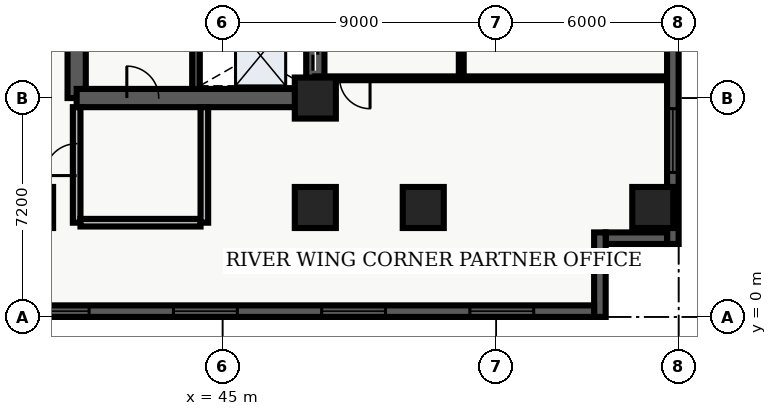
"""IFC4 building model, lengths in metres.
Left out: names, types, materials, properties, quantities, classifications, styles, units other than length and angle.
Written with IfcOpenShell. Run it as: python <this file> out.ifc"""

import sys

from ifc_helpers import new_model, entity, si_unit, converted_unit, direction, frame, origin_with_axes, origin_2d_with_axis, place, context, subcontext, project, spatial, polyline, rectangle, outline, extrude, element, fill, save


model = new_model("IFC4")
c1 = context("Model", 3, precision=1e-05, world=origin_with_axes(), true_north=direction((0.0, 1.0)))
c2 = subcontext(c1, "Body", "Model", "MODEL_VIEW")
j1 = project(units=[si_unit("LENGTHUNIT", "METRE"), converted_unit("PLANEANGLEUNIT", "DEGREE", entity("IfcPlaneAngleMeasure", 0.017), si_unit("PLANEANGLEUNIT", "RADIAN"), dimensions=[0, 0, 0, 0, 0, 0, 0])], contexts=[c1])
p1 = place(None, origin_with_axes())
s1 = spatial("IfcSite", under=j1, at=p1, CompositionType="ELEMENT")
p2 = place(p1, origin_with_axes())
s2 = spatial("IfcBuilding", under=s1, at=p2, CompositionType="ELEMENT")
p3 = place(p2, frame((0.0, 0.0, 56.1), z_axis=(0.0, 0.0, 1.0), x_axis=(1.0, 0.0, 0.0)))
s3 = spatial("IfcBuildingStorey", under=s2, at=p3, CompositionType="ELEMENT", Elevation=56.1)
p4 = place(p3, frame((40.2, 7.2, 0.0), z_axis=(0.0, 0.0, 1.0), x_axis=(0.0, 1.0, 0.0)))
e1 = element("IfcWall", 1, at=p4, inside=s3, PredefinedType="SHEAR", context=c2, shape_type="SweptSolid", body=[
    extrude(outline(polyline([(0.0, -0.3), (15.6, -0.3), (15.6, 0.3), (0.0, 0.3), (0.0, -0.3)])), origin_with_axes(), (0.0, 0.0, 1.0), 3.66),
])
p5 = place(p4, frame((12.75, 0.0, 0.0), z_axis=(0.0, 0.0, 1.0), x_axis=(1.0, 0.0, 0.0)))
e2 = element("IfcOpeningElement", 2, at=p5, cuts=e1, PredefinedType="OPENING", context=c2, shape_type="SweptSolid", body=[
    extrude(rectangle(XDim=1.2, YDim=0.62, at=origin_2d_with_axis()), origin_with_axes(), (0.0, 0.0, 1.0), 2.15),
])
p6 = place(p4, frame((9.3, 0.0, 0.0), z_axis=(0.0, 0.0, 1.0), x_axis=(1.0, 0.0, 0.0)))
e3 = element("IfcOpeningElement", 3, at=p6, cuts=e1, PredefinedType="OPENING", context=c2, shape_type="SweptSolid", body=[
    extrude(rectangle(XDim=0.9, YDim=0.62, at=origin_2d_with_axis()), origin_with_axes(), (0.0, 0.0, 1.0), 2.15),
])
p7 = place(p3, frame((40.2, 7.2, 0.0), z_axis=(0.0, 0.0, 1.0), x_axis=(1.0, 0.0, 0.0)))
e4 = element("IfcWall", 4, at=p7, inside=s3, PredefinedType="SHEAR", context=c2, shape_type="SweptSolid", body=[
    extrude(outline(polyline([(0.0, -0.3), (7.85, -0.3), (7.85, 0.3), (0.0, 0.3), (0.0, -0.3)])), origin_with_axes(), (0.0, 0.0, 1.0), 3.66),
])
p8 = place(p7, frame((2.175, 0.0, 0.0), z_axis=(0.0, 0.0, 1.0), x_axis=(1.0, 0.0, 0.0)))
e5 = element("IfcOpeningElement", 5, at=p8, cuts=e4, PredefinedType="OPENING", context=c2, shape_type="SweptSolid", body=[
    extrude(rectangle(XDim=1.05, YDim=0.62, at=origin_2d_with_axis()), origin_with_axes(), (0.0, 0.0, 1.0), 2.15),
])
p9 = place(p3, frame((48.05, 7.2, 0.0), z_axis=(0.0, 0.0, 1.0), x_axis=(0.0, 1.0, 0.0)))
e6 = element("IfcWall", 6, at=p9, inside=s3, PredefinedType="SHEAR", context=c2, shape_type="SweptSolid", body=[
    extrude(outline(polyline([(0.0, -0.3), (15.6, -0.3), (15.6, 0.3), (0.0, 0.3), (0.0, -0.3)])), origin_with_axes(), (0.0, 0.0, 1.0), 3.66),
])
p10 = place(p9, frame((1.425, 0.0, 0.0), z_axis=(0.0, 0.0, 1.0), x_axis=(1.0, 0.0, 0.0)))
e7 = element("IfcOpeningElement", 7, at=p10, cuts=e6, PredefinedType="OPENING", context=c2, shape_type="SweptSolid", body=[
    extrude(rectangle(XDim=1.05, YDim=0.62, at=origin_2d_with_axis()), origin_with_axes(), (0.0, 0.0, 1.0), 2.15),
])
p11 = place(p9, frame((3.475, 0.0, 0.0), z_axis=(0.0, 0.0, 1.0), x_axis=(1.0, 0.0, 0.0)))
e8 = element("IfcOpeningElement", 8, at=p11, cuts=e6, PredefinedType="OPENING", context=c2, shape_type="SweptSolid", body=[
    extrude(rectangle(XDim=1.05, YDim=0.62, at=origin_2d_with_axis()), origin_with_axes(), (0.0, 0.0, 1.0), 2.15),
])
p12 = place(p9, frame((5.625, 0.0, 0.0), z_axis=(0.0, 0.0, 1.0), x_axis=(1.0, 0.0, 0.0)))
e9 = element("IfcOpeningElement", 9, at=p12, cuts=e6, PredefinedType="OPENING", context=c2, shape_type="SweptSolid", body=[
    extrude(rectangle(XDim=0.95, YDim=0.62, at=origin_2d_with_axis()), origin_with_axes(), (0.0, 0.0, 1.0), 2.15),
])
p13 = place(p3, frame((44.125, 7.5, 0.0), z_axis=(0.0, 0.0, 1.0), x_axis=(0.0, 1.0, 0.0)))
e10 = element("IfcWall", 10, at=p13, inside=s3, PredefinedType="SHEAR", context=c2, shape_type="SweptSolid", body=[
    extrude(outline(polyline([(0.0, -0.125), (15.0, -0.125), (15.0, 0.125), (0.0, 0.125), (0.0, -0.125)])), origin_with_axes(), (0.0, 0.0, 1.0), 3.66),
])
p14 = place(p3, frame((40.2, 3.1, 0.0), z_axis=(0.0, 0.0, 1.0), x_axis=(0.0, 1.0, 0.0)))
e11 = element("IfcWall", 11, at=p14, inside=s3, PredefinedType="SOLIDWALL", context=c2, shape_type="SweptSolid", body=[
    extrude(outline(polyline([(0.0, -0.125), (3.8, -0.125), (3.8, 0.125), (0.0, 0.125), (0.0, -0.125)])), origin_with_axes(), (0.0, 0.0, 1.0), 2.7),
])
p15 = place(p14, frame((2.075, 0.0, 0.0), z_axis=(0.0, 0.0, 1.0), x_axis=(1.0, 0.0, 0.0)))
e12 = element("IfcOpeningElement", 12, at=p15, cuts=e11, PredefinedType="OPENING", context=c2, shape_type="SweptSolid", body=[
    extrude(rectangle(XDim=1.05, YDim=0.27, at=origin_2d_with_axis()), origin_with_axes(), (0.0, 0.0, 1.0), 2.15),
])
p16 = place(p3, frame((40.325, 3.1, 0.0), z_axis=(0.0, 0.0, 1.0), x_axis=(1.0, 0.0, 0.0)))
e13 = element("IfcWall", 13, at=p16, inside=s3, PredefinedType="SOLIDWALL", context=c2, shape_type="SweptSolid", body=[
    extrude(outline(polyline([(0.0, -0.125), (3.95, -0.125), (3.95, 0.125), (0.0, 0.125), (0.0, -0.125)])), origin_with_axes(), (0.0, 0.0, 1.0), 2.7),
])
p17 = place(p3, frame((44.4, 3.1, 0.0), z_axis=(0.0, 0.0, 1.0), x_axis=(0.0, 1.0, 0.0)))
e14 = element("IfcWall", 14, at=p17, inside=s3, PredefinedType="SOLIDWALL", context=c2, shape_type="SweptSolid", body=[
    extrude(outline(polyline([(0.0, -0.125), (3.8, -0.125), (3.8, 0.125), (0.0, 0.125), (0.0, -0.125)])), origin_with_axes(), (0.0, 0.0, 1.0), 2.7),
])
for number, where, z_axis, x_axis in (
    (15, (38.75, 3.6, 0.0), (0.0, 0.0, 1.0), (1.0, 0.0, 0.0)),
    (16, (48.05, 3.6, 0.0), (0.0, 0.0, 1.0), (1.0, 0.0, 0.0)),
    (17, (48.05, 7.2, 0.0), (0.0, 0.0, 1.0), (1.0, 0.0, 0.0)),
    (18, (51.6, 3.6, 0.0), (0.0, 0.0, 1.0), (1.0, 0.0, 0.0)),
    (19, (59.15, 3.6, 0.0), (0.0, 0.0, 1.0), (1.0, 0.0, 0.0)),
):
    element("IfcColumn", number, at=place(p3, frame(where, z_axis=z_axis, x_axis=x_axis)), inside=s3, PredefinedType="COLUMN", context=c2, shape_type="SweptSolid", body=[
        extrude(rectangle(XDim=1.35, YDim=1.35, at=origin_2d_with_axis()), origin_with_axes(), (0.0, 0.0, 1.0), 3.9),
    ])
p18 = place(p3, frame((52.85, 7.85, 0.0), z_axis=(0.0, 0.0, 1.0), x_axis=(0.0, 1.0, 0.0)))
e20 = element("IfcWall", 20, at=p18, inside=s3, PredefinedType="PARTITIONING", context=c2, shape_type="SweptSolid", body=[
    extrude(outline(polyline([(0.0, -0.08), (18.8, -0.08), (18.8, 0.08), (0.0, 0.08), (0.0, -0.08)])), origin_with_axes(), (0.0, 0.0, 1.0), 2.7),
])
p19 = place(p18, frame((4.4, 0.0, 0.0), z_axis=(0.0, 0.0, 1.0), x_axis=(1.0, 0.0, 0.0)))
e21 = element("IfcOpeningElement", 21, at=p19, cuts=e20, PredefinedType="OPENING", context=c2, shape_type="SweptSolid", body=[
    extrude(rectangle(XDim=1.0, YDim=0.18, at=origin_2d_with_axis()), origin_with_axes(), (0.0, 0.0, 1.0), 2.15),
])
p20 = place(p18, frame((7.799, 0.0, 0.0), z_axis=(0.0, 0.0, 1.0), x_axis=(1.0, 0.0, 0.0)))
e22 = element("IfcOpeningElement", 22, at=p20, cuts=e20, PredefinedType="OPENING", context=c2, shape_type="SweptSolid", body=[
    extrude(rectangle(XDim=1.0, YDim=0.18, at=origin_2d_with_axis()), origin_with_axes(), (0.0, 0.0, 1.0), 2.15),
])
p21 = place(p18, frame((14.034, 0.0, 0.0), z_axis=(0.0, 0.0, 1.0), x_axis=(1.0, 0.0, 0.0)))
e23 = element("IfcOpeningElement", 23, at=p21, cuts=e20, PredefinedType="OPENING", context=c2, shape_type="SweptSolid", body=[
    extrude(rectangle(XDim=1.0, YDim=0.18, at=origin_2d_with_axis()), origin_with_axes(), (0.0, 0.0, 1.0), 2.15),
])
p22 = place(p3, frame((59.64, 7.85, 0.0), z_axis=(0.0, 0.0, 1.0), x_axis=(-1.0, 0.0, 0.0)))
e24 = element("IfcWall", 24, at=p22, inside=s3, PredefinedType="PARTITIONING", context=c2, shape_type="SweptSolid", body=[
    extrude(outline(polyline([(0.0, -0.062), (11.59, -0.062), (11.59, 0.062), (0.0, 0.062), (0.0, -0.062)])), origin_with_axes(), (0.0, 0.0, 1.0), 2.7),
])
p23 = place(p22, frame((10.29, 0.0, 0.0), z_axis=(0.0, 0.0, 1.0), x_axis=(1.0, 0.0, 0.0)))
e25 = element("IfcOpeningElement", 25, at=p23, cuts=e24, PredefinedType="OPENING", context=c2, shape_type="SweptSolid", body=[
    extrude(rectangle(XDim=1.0, YDim=0.145, at=origin_2d_with_axis()), origin_with_axes(), (0.0, 0.0, 1.0), 2.15),
])
p24 = place(p3, frame((59.81, 26.02, 0.0), z_axis=(0.0, 0.0, 1.0), x_axis=(0.0, -1.0, 0.0)))
e26 = element("IfcWall", 26, at=p24, inside=s3, PredefinedType="SOLIDWALL", context=c2, shape_type="SweptSolid", body=[
    extrude(outline(polyline([(0.0, -0.19), (23.62, -0.19), (23.62, 0.19), (0.0, 0.19), (0.0, -0.19)])), origin_with_axes(), (0.0, 0.0, 1.0), 3.66),
])
p25 = place(p24, frame((3.853, 0.0, 0.45), z_axis=(0.0, 0.0, 1.0), x_axis=(1.0, 0.0, 0.0)))
e27 = element("IfcOpeningElement", 27, at=p25, cuts=e26, PredefinedType="OPENING", context=c2, shape_type="SweptSolid", body=[
    extrude(rectangle(XDim=2.1, YDim=0.4, at=origin_2d_with_axis()), origin_with_axes(), (0.0, 0.0, 1.0), 2.2),
])
p26 = place(p24, frame((20.218, 0.0, 0.45), z_axis=(0.0, 0.0, 1.0), x_axis=(1.0, 0.0, 0.0)))
e28 = element("IfcOpeningElement", 28, at=p26, cuts=e26, PredefinedType="OPENING", context=c2, shape_type="SweptSolid", body=[
    extrude(rectangle(XDim=2.1, YDim=0.4, at=origin_2d_with_axis()), origin_with_axes(), (0.0, 0.0, 1.0), 2.2),
])
p27 = place(p3, frame((59.62, 2.59, 0.0), z_axis=(0.0, 0.0, 1.0), x_axis=(-1.0, 0.0, 0.0)))
e29 = element("IfcWall", 29, at=p27, inside=s3, PredefinedType="SOLIDWALL", context=c2, shape_type="SweptSolid", body=[
    extrude(outline(polyline([(0.0, -0.19), (2.02, -0.19), (2.02, 0.19), (0.0, 0.19), (0.0, -0.19)])), origin_with_axes(), (0.0, 0.0, 1.0), 3.66),
])
p28 = place(p3, frame((57.41, 2.78, 0.0), z_axis=(0.0, 0.0, 1.0), x_axis=(0.0, -1.0, 0.0)))
e30 = element("IfcWall", 30, at=p28, inside=s3, PredefinedType="SOLIDWALL", context=c2, shape_type="SweptSolid", body=[
    extrude(outline(polyline([(0.0, -0.19), (2.78, -0.19), (2.78, 0.19), (0.0, 0.19), (0.0, -0.19)])), origin_with_axes(), (0.0, 0.0, 1.0), 3.66),
])
p29 = place(p3, frame((57.22, 0.19, 0.0), z_axis=(0.0, 0.0, 1.0), x_axis=(-1.0, 0.0, 0.0)))
e31 = element("IfcWall", 31, at=p29, inside=s3, PredefinedType="SOLIDWALL", context=c2, shape_type="SweptSolid", body=[
    extrude(outline(polyline([(0.0, -0.19), (54.82, -0.19), (54.82, 0.19), (0.0, 0.19), (0.0, -0.19)])), origin_with_axes(), (0.0, 0.0, 1.0), 3.66),
])
p30 = place(p29, frame((3.037, 0.0, 0.45), z_axis=(0.0, 0.0, 1.0), x_axis=(1.0, 0.0, 0.0)))
e32 = element("IfcOpeningElement", 32, at=p30, cuts=e31, PredefinedType="OPENING", context=c2, shape_type="SweptSolid", body=[
    extrude(rectangle(XDim=2.1, YDim=0.4, at=origin_2d_with_axis()), origin_with_axes(), (0.0, 0.0, 1.0), 2.2),
])
p31 = place(p29, frame((7.912, 0.0, 0.45), z_axis=(0.0, 0.0, 1.0), x_axis=(1.0, 0.0, 0.0)))
e33 = element("IfcOpeningElement", 33, at=p31, cuts=e31, PredefinedType="OPENING", context=c2, shape_type="SweptSolid", body=[
    extrude(rectangle(XDim=2.1, YDim=0.4, at=origin_2d_with_axis()), origin_with_axes(), (0.0, 0.0, 1.0), 2.2),
])
p32 = place(p29, frame((12.786, 0.0, 0.45), z_axis=(0.0, 0.0, 1.0), x_axis=(1.0, 0.0, 0.0)))
e34 = element("IfcOpeningElement", 34, at=p32, cuts=e31, PredefinedType="OPENING", context=c2, shape_type="SweptSolid", body=[
    extrude(rectangle(XDim=2.1, YDim=0.4, at=origin_2d_with_axis()), origin_with_axes(), (0.0, 0.0, 1.0), 2.2),
])
p33 = place(p29, frame((17.661, 0.0, 0.45), z_axis=(0.0, 0.0, 1.0), x_axis=(1.0, 0.0, 0.0)))
e35 = element("IfcOpeningElement", 35, at=p33, cuts=e31, PredefinedType="OPENING", context=c2, shape_type="SweptSolid", body=[
    extrude(rectangle(XDim=2.1, YDim=0.4, at=origin_2d_with_axis()), origin_with_axes(), (0.0, 0.0, 1.0), 2.2),
])
p34 = place(p29, frame((22.535, 0.0, 0.45), z_axis=(0.0, 0.0, 1.0), x_axis=(1.0, 0.0, 0.0)))
e36 = element("IfcOpeningElement", 36, at=p34, cuts=e31, PredefinedType="OPENING", context=c2, shape_type="SweptSolid", body=[
    extrude(rectangle(XDim=2.1, YDim=0.4, at=origin_2d_with_axis()), origin_with_axes(), (0.0, 0.0, 1.0), 2.2),
])
p35 = place(p29, frame((37.159, 0.0, 0.45), z_axis=(0.0, 0.0, 1.0), x_axis=(1.0, 0.0, 0.0)))
e37 = element("IfcOpeningElement", 37, at=p35, cuts=e31, PredefinedType="OPENING", context=c2, shape_type="SweptSolid", body=[
    extrude(rectangle(XDim=2.1, YDim=0.4, at=origin_2d_with_axis()), origin_with_axes(), (0.0, 0.0, 1.0), 2.2),
])
p36 = place(p29, frame((42.034, 0.0, 0.45), z_axis=(0.0, 0.0, 1.0), x_axis=(1.0, 0.0, 0.0)))
e38 = element("IfcOpeningElement", 38, at=p36, cuts=e31, PredefinedType="OPENING", context=c2, shape_type="SweptSolid", body=[
    extrude(rectangle(XDim=2.1, YDim=0.4, at=origin_2d_with_axis()), origin_with_axes(), (0.0, 0.0, 1.0), 2.2),
])
p37 = place(p29, frame((51.783, 0.0, 0.45), z_axis=(0.0, 0.0, 1.0), x_axis=(1.0, 0.0, 0.0)))
e39 = element("IfcOpeningElement", 39, at=p37, cuts=e31, PredefinedType="OPENING", context=c2, shape_type="SweptSolid", body=[
    extrude(rectangle(XDim=2.1, YDim=0.4, at=origin_2d_with_axis()), origin_with_axes(), (0.0, 0.0, 1.0), 2.2),
])
p38 = place(p9, frame((1.425, 0.0, 0.0), z_axis=(0.0, 0.0, 1.0), x_axis=(1.0, 0.0, 0.0)))
e40 = element("IfcDoor", 40, at=p38, inside=s3, OperationType="SLIDING_TO_LEFT", PredefinedType="DOOR", context=c2, shape_type="SweptSolid", body=[
    extrude(rectangle(XDim=1.05, YDim=0.09, at=origin_2d_with_axis()), origin_with_axes(), (0.0, 0.0, 1.0), 2.15),
])
fill(e7, e40)
p39 = place(p7, frame((2.175, 0.0, 0.0), z_axis=(0.0, 0.0, 1.0), x_axis=(1.0, 0.0, 0.0)))
e41 = element("IfcDoor", 41, at=p39, inside=s3, OperationType="SINGLE_SWING_LEFT", PredefinedType="DOOR", context=c2, shape_type="SweptSolid", body=[
    extrude(rectangle(XDim=1.05, YDim=0.09, at=origin_2d_with_axis()), origin_with_axes(), (0.0, 0.0, 1.0), 2.15),
])
fill(e5, e41)
p40 = place(p14, frame((2.075, 0.0, 0.0), z_axis=(0.0, 0.0, 1.0), x_axis=(1.0, 0.0, 0.0)))
e42 = element("IfcDoor", 42, at=p40, inside=s3, OperationType="SINGLE_SWING_LEFT", PredefinedType="DOOR", context=c2, shape_type="SweptSolid", body=[
    extrude(rectangle(XDim=1.05, YDim=0.09, at=origin_2d_with_axis()), origin_with_axes(), (0.0, 0.0, 1.0), 2.15),
])
fill(e12, e42)
p41 = place(p22, frame((10.29, 0.0, 0.0), z_axis=(0.0, 0.0, 1.0), x_axis=(1.0, 0.0, 0.0)))
e43 = element("IfcDoor", 43, at=p41, inside=s3, OperationType="SINGLE_SWING_LEFT", PredefinedType="DOOR", context=c2, shape_type="SweptSolid", body=[
    extrude(rectangle(XDim=1.0, YDim=0.075, at=origin_2d_with_axis()), origin_with_axes(), (0.0, 0.0, 1.0), 2.15),
])
fill(e25, e43)
p42 = place(p24, frame((20.218, 0.0, 0.45), z_axis=(0.0, 0.0, 1.0), x_axis=(1.0, 0.0, 0.0)))
e44 = element("IfcWindow", 44, at=p42, inside=s3, PredefinedType="WINDOW", context=c2, shape_type="SweptSolid", body=[
    extrude(rectangle(XDim=2.1, YDim=0.09, at=origin_2d_with_axis()), origin_with_axes(), (0.0, 0.0, 1.0), 2.2),
])
fill(e28, e44)
p43 = place(p29, frame((3.037, 0.0, 0.45), z_axis=(0.0, 0.0, 1.0), x_axis=(1.0, 0.0, 0.0)))
e45 = element("IfcWindow", 45, at=p43, inside=s3, PredefinedType="WINDOW", context=c2, shape_type="SweptSolid", body=[
    extrude(rectangle(XDim=2.1, YDim=0.09, at=origin_2d_with_axis()), origin_with_axes(), (0.0, 0.0, 1.0), 2.2),
])
fill(e32, e45)
p44 = place(p29, frame((7.912, 0.0, 0.45), z_axis=(0.0, 0.0, 1.0), x_axis=(1.0, 0.0, 0.0)))
e46 = element("IfcWindow", 46, at=p44, inside=s3, PredefinedType="WINDOW", context=c2, shape_type="SweptSolid", body=[
    extrude(rectangle(XDim=2.1, YDim=0.09, at=origin_2d_with_axis()), origin_with_axes(), (0.0, 0.0, 1.0), 2.2),
])
fill(e33, e46)
p45 = place(p29, frame((12.786, 0.0, 0.45), z_axis=(0.0, 0.0, 1.0), x_axis=(1.0, 0.0, 0.0)))
e47 = element("IfcWindow", 47, at=p45, inside=s3, PredefinedType="WINDOW", context=c2, shape_type="SweptSolid", body=[
    extrude(rectangle(XDim=2.1, YDim=0.09, at=origin_2d_with_axis()), origin_with_axes(), (0.0, 0.0, 1.0), 2.2),
])
fill(e34, e47)
p46 = place(p29, frame((17.661, 0.0, 0.45), z_axis=(0.0, 0.0, 1.0), x_axis=(1.0, 0.0, 0.0)))
e48 = element("IfcWindow", 48, at=p46, inside=s3, PredefinedType="WINDOW", context=c2, shape_type="SweptSolid", body=[
    extrude(rectangle(XDim=2.1, YDim=0.09, at=origin_2d_with_axis()), origin_with_axes(), (0.0, 0.0, 1.0), 2.2),
])
fill(e35, e48)
save(model, sys.argv[1])
